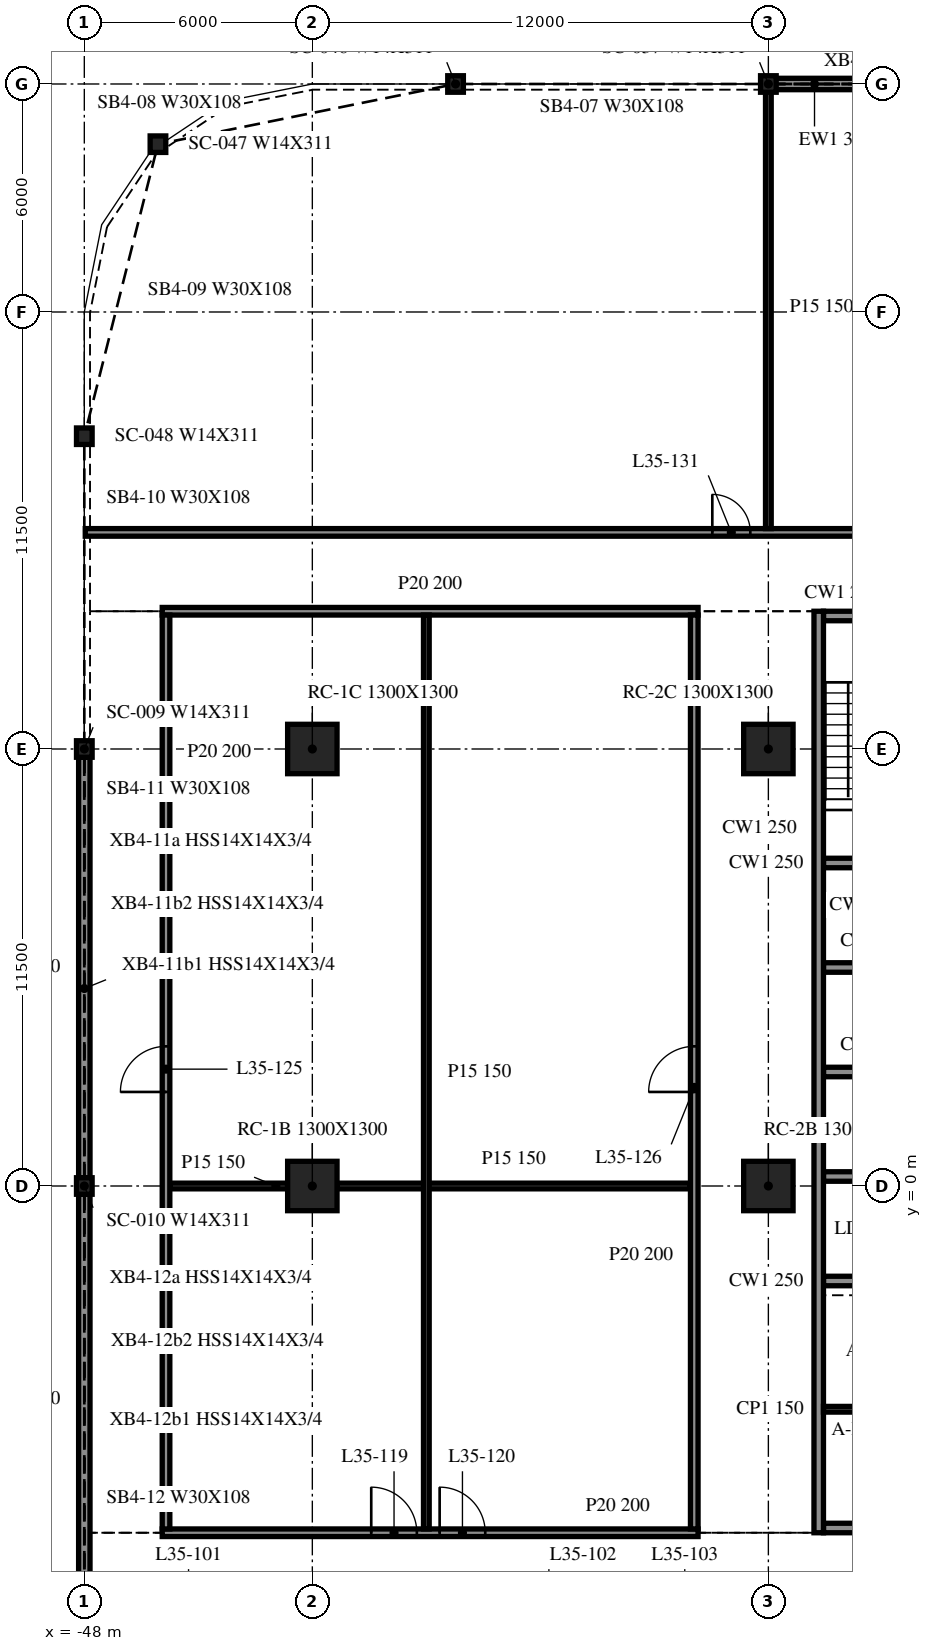
"""IFC4 building model, lengths in metres.
Left out: names, types, materials, properties, quantities, classifications, styles, units other than length and angle.
Written with IfcOpenShell. Run it as: python <this file> out.ifc"""

import sys

from ifc_helpers import new_model, si_unit, direction, frame, frame_2d, origin, origin_2d, place, context, subcontext, project, spatial, rectangle, i_section, extrude, element, fill, save


model = new_model("IFC4")
c1 = context("Model", 3, precision=1e-05, world=origin(), true_north=direction((0.0, 1.0)))
c2 = subcontext(c1, "Body", "Model", "MODEL_VIEW")
j1 = project(units=[si_unit("LENGTHUNIT", "METRE"), si_unit("PLANEANGLEUNIT", "RADIAN")], contexts=[c1])
p1 = place(None, origin())
s1 = spatial("IfcSite", under=j1, at=p1, CompositionType="ELEMENT")
p2 = place(p1, origin())
s2 = spatial("IfcBuilding", under=s1, at=p2, CompositionType="ELEMENT")
p3 = place(p2, frame((0.0, 0.0, 150.7)))
s3 = spatial("IfcBuildingStorey", under=s2, at=p3, CompositionType="ELEMENT", Elevation=150.7)
for number, where, z_axis, x_axis in (
    (1, (-42.0, 0.0, -0.34), (0.0, 0.0, 1.0), (1.0, 0.0, 0.0)),
    (2, (-42.0, 11.5, -0.34), (0.0, 0.0, 1.0), (1.0, 0.0, 0.0)),
    (3, (-30.0, 0.0, -0.34), (0.0, 0.0, 1.0), (1.0, 0.0, 0.0)),
    (4, (-30.0, 11.5, -0.34), (0.0, 0.0, 1.0), (1.0, 0.0, 0.0)),
):
    element("IfcColumn", number, at=place(p3, frame(where, z_axis=z_axis, x_axis=x_axis)), inside=s3, PredefinedType="COLUMN", context=c2, shape_type="SweptSolid", body=[
        extrude(rectangle(XDim=1.3, YDim=1.3, at=origin_2d()), origin(), (0.0, 0.0, 1.0), 3.89),
    ])
for number, where, z_axis, x_axis in (
    (5, (-30.0, 29.0, -0.34), (0.0, 0.0, 1.0), (1.0, 0.0, 0.0)),
    (6, (-38.231, 29.0, -0.34), (0.0, 0.0, 1.0), (1.0, 0.0, 0.0)),
    (7, (-46.062, 27.416, -0.34), (0.0, 0.0, 1.0), (1.0, 0.0, 0.0)),
    (8, (-48.0, 19.731, -0.34), (0.0, 0.0, 1.0), (1.0, 0.0, 0.0)),
    (9, (-48.0, 11.5, -0.34), (0.0, 0.0, 1.0), (1.0, 0.0, 0.0)),
    (10, (-48.0, 0.0, -0.34), (0.0, 0.0, 1.0), (1.0, 0.0, 0.0)),
):
    element("IfcColumn", number, at=place(p3, frame(where, z_axis=z_axis, x_axis=x_axis)), inside=s3, PredefinedType="COLUMN", context=c2, shape_type="SweptSolid", body=[
        extrude(i_section(OverallWidth=0.412, OverallDepth=0.434, WebThickness=0.036, FlangeThickness=0.057, at=origin_2d()), origin(), (0.0, 0.0, 1.0), 3.89),
    ])
p4 = place(p3, frame((-18.018, 29.0, 0.0), z_axis=(0.0, 0.0, 1.0), x_axis=(-1.0, 0.0, 0.0)))
e11 = element("IfcWall", 11, at=p4, inside=s3, PredefinedType="NOTDEFINED", context=c2, shape_type="SweptSolid", body=[
    extrude(rectangle(XDim=11.964, YDim=0.3, at=frame_2d((5.982, 0.0))), origin(), (0.0, 0.0, 1.0), 3.55),
])
p5 = place(p3, frame((-48.0, 11.282, 0.0), z_axis=(0.0, 0.0, 1.0), x_axis=(0.0, -1.0, 0.0)))
e12 = element("IfcWall", 12, at=p5, inside=s3, PredefinedType="NOTDEFINED", context=c2, shape_type="SweptSolid", body=[
    extrude(rectangle(XDim=11.064, YDim=0.3, at=frame_2d((5.532, 0.0))), origin(), (0.0, 0.0, 1.0), 3.55),
])
p6 = place(p3, frame((-48.0, -0.218, 0.0), z_axis=(0.0, 0.0, 1.0), x_axis=(0.0, -1.0, 0.0)))
e13 = element("IfcWall", 13, at=p6, inside=s3, PredefinedType="NOTDEFINED", context=c2, shape_type="SweptSolid", body=[
    extrude(rectangle(XDim=10.782, YDim=0.3, at=frame_2d((5.391, 0.0))), origin(), (0.0, 0.0, 1.0), 3.55),
])
p7 = place(p3, frame((-28.675, 15.125, 0.0), z_axis=(0.0, 0.0, 1.0), x_axis=(0.0, -1.0, 0.0)))
e14 = element("IfcWall", 14, at=p7, inside=s3, PredefinedType="SOLIDWALL", context=c2, shape_type="SweptSolid", body=[
    extrude(rectangle(XDim=24.25, YDim=0.25, at=frame_2d((12.125, 0.0))), origin(), (0.0, 0.0, 1.0), 3.55),
])
p8 = place(p3, frame((-19.45, -9.0, 0.0), z_axis=(0.0, 0.0, 1.0), x_axis=(-1.0, 0.0, 0.0)))
e15 = element("IfcWall", 15, at=p8, inside=s3, PredefinedType="SOLIDWALL", context=c2, shape_type="SweptSolid", body=[
    extrude(rectangle(XDim=9.1, YDim=0.25, at=frame_2d((4.55, 0.0))), origin(), (0.0, 0.0, 1.0), 3.55),
])
p9 = place(p8, frame((3.65, 0.0, 0.0)))
e16 = element("IfcOpeningElement", 16, at=p9, cuts=e15, PredefinedType="OPENING", context=c2, shape_type="SweptSolid", body=[
    extrude(rectangle(XDim=1.8, YDim=2.1, at=frame_2d((0.9, 1.05))), frame((0.0, 0.135, 0.0), z_axis=(0.0, -1.0, 0.0), x_axis=(1.0, 0.0, 0.0)), (0.0, 0.0, 1.0), 0.27),
])
p10 = place(p3, frame((-28.55, 15.0, 0.0), z_axis=(0.0, 0.0, 1.0), x_axis=(1.0, 0.0, 0.0)))
e17 = element("IfcWall", 17, at=p10, inside=s3, PredefinedType="SOLIDWALL", context=c2, shape_type="SweptSolid", body=[
    extrude(rectangle(XDim=9.1, YDim=0.25, at=frame_2d((4.55, 0.0))), origin(), (0.0, 0.0, 1.0), 3.55),
])
p11 = place(p10, frame((3.65, 0.0, 0.0)))
e18 = element("IfcOpeningElement", 18, at=p11, cuts=e17, PredefinedType="OPENING", context=c2, shape_type="SweptSolid", body=[
    extrude(rectangle(XDim=1.8, YDim=2.1, at=frame_2d((0.9, 1.05))), frame((0.0, 0.135, 0.0), z_axis=(0.0, -1.0, 0.0), x_axis=(1.0, 0.0, 0.0)), (0.0, 0.0, 1.0), 0.27),
])
for number, where, z_axis, x_axis in (
    (19, (-28.55, -2.5, 0.0), (0.0, 0.0, 1.0), (1.0, 0.0, 0.0)),
    (20, (-28.55, 0.25, 0.0), (0.0, 0.0, 1.0), (1.0, 0.0, 0.0)),
    (21, (-28.55, 3.0, 0.0), (0.0, 0.0, 1.0), (1.0, 0.0, 0.0)),
    (22, (-28.55, 5.75, 0.0), (0.0, 0.0, 1.0), (1.0, 0.0, 0.0)),
    (23, (-28.55, 8.5, 0.0), (0.0, 0.0, 1.0), (1.0, 0.0, 0.0)),
):
    element("IfcWall", number, at=place(p3, frame(where, z_axis=z_axis, x_axis=x_axis)), inside=s3, PredefinedType="SOLIDWALL", context=c2, shape_type="SweptSolid", body=[
        extrude(rectangle(XDim=2.85, YDim=0.25, at=frame_2d((1.425, 0.0))), origin(), (0.0, 0.0, 1.0), 3.55),
    ])
p12 = place(p3, frame((-28.55, -5.875, 0.0), z_axis=(0.0, 0.0, 1.0), x_axis=(1.0, 0.0, 0.0)))
e24 = element("IfcWall", 24, at=p12, inside=s3, PredefinedType="PARTITIONING", context=c2, shape_type="SweptSolid", body=[
    extrude(rectangle(XDim=2.85, YDim=0.15, at=frame_2d((1.425, 0.0))), origin(), (0.0, 0.0, 1.0), 3.55),
])
p13 = place(p3, frame((-45.95, -9.125, 0.0), z_axis=(0.0, 0.0, 1.0), x_axis=(1.0, 0.0, 0.0)))
e25 = element("IfcWall", 25, at=p13, inside=s3, PredefinedType="PARTITIONING", context=c2, shape_type="SweptSolid", body=[
    extrude(rectangle(XDim=14.1, YDim=0.2, at=frame_2d((7.05, 0.0))), origin(), (0.0, 0.0, 1.0), 3.55),
])
p14 = place(p13, frame((5.5, 0.0, 0.0)))
e26 = element("IfcOpeningElement", 26, at=p14, cuts=e25, PredefinedType="OPENING", context=c2, shape_type="SweptSolid", body=[
    extrude(rectangle(XDim=1.2, YDim=2.1, at=frame_2d((0.6, 1.05))), frame((0.0, 0.11, 0.0), z_axis=(0.0, -1.0, 0.0), x_axis=(1.0, 0.0, 0.0)), (0.0, 0.0, 1.0), 0.22),
])
p15 = place(p13, frame((7.3, 0.0, 0.0)))
e27 = element("IfcOpeningElement", 27, at=p15, cuts=e25, PredefinedType="OPENING", context=c2, shape_type="SweptSolid", body=[
    extrude(rectangle(XDim=1.2, YDim=2.1, at=frame_2d((0.6, 1.05))), frame((0.0, 0.11, 0.0), z_axis=(0.0, -1.0, 0.0), x_axis=(1.0, 0.0, 0.0)), (0.0, 0.0, 1.0), 0.22),
])
p16 = place(p3, frame((-45.75, 0.0, 0.0), z_axis=(0.0, 0.0, 1.0), x_axis=(1.0, 0.0, 0.0)))
e28 = element("IfcWall", 28, at=p16, inside=s3, PredefinedType="PARTITIONING", context=c2, shape_type="SweptSolid", body=[
    extrude(rectangle(XDim=3.1, YDim=0.15, at=frame_2d((1.55, 0.0))), origin(), (0.0, 0.0, 1.0), 3.55),
])
p17 = place(p3, frame((-41.35, 0.0, 0.0), z_axis=(0.0, 0.0, 1.0), x_axis=(1.0, 0.0, 0.0)))
e29 = element("IfcWall", 29, at=p17, inside=s3, PredefinedType="PARTITIONING", context=c2, shape_type="SweptSolid", body=[
    extrude(rectangle(XDim=9.3, YDim=0.15, at=frame_2d((4.65, 0.0))), origin(), (0.0, 0.0, 1.0), 3.55),
])
p18 = place(p3, frame((-45.95, 15.125, 0.0), z_axis=(0.0, 0.0, 1.0), x_axis=(1.0, 0.0, 0.0)))
e30 = element("IfcWall", 30, at=p18, inside=s3, PredefinedType="PARTITIONING", context=c2, shape_type="SweptSolid", body=[
    extrude(rectangle(XDim=14.1, YDim=0.2, at=frame_2d((7.05, 0.0))), origin(), (0.0, 0.0, 1.0), 3.55),
])
p19 = place(p3, frame((-47.975, 17.2, 0.0), z_axis=(0.0, 0.0, 1.0), x_axis=(1.0, 0.0, 0.0)))
e31 = element("IfcWall", 31, at=p19, inside=s3, PredefinedType="PARTITIONING", context=c2, shape_type="SweptSolid", body=[
    extrude(rectangle(XDim=95.95, YDim=0.2, at=frame_2d((47.975, 0.0))), origin(), (0.0, 0.0, 1.0), 3.55),
])
p20 = place(p19, frame((16.5, 0.0, 0.0)))
e32 = element("IfcOpeningElement", 32, at=p20, cuts=e31, PredefinedType="OPENING", context=c2, shape_type="SweptSolid", body=[
    extrude(rectangle(XDim=1.0, YDim=2.1, at=frame_2d((0.5, 1.05))), frame((0.0, 0.11, 0.0), z_axis=(0.0, -1.0, 0.0), x_axis=(1.0, 0.0, 0.0)), (0.0, 0.0, 1.0), 0.22),
])
p21 = place(p19, frame((22.5, 0.0, 0.0)))
e33 = element("IfcOpeningElement", 33, at=p21, cuts=e31, PredefinedType="OPENING", context=c2, shape_type="SweptSolid", body=[
    extrude(rectangle(XDim=1.0, YDim=2.1, at=frame_2d((0.5, 1.05))), frame((0.0, 0.11, 0.0), z_axis=(0.0, -1.0, 0.0), x_axis=(1.0, 0.0, 0.0)), (0.0, 0.0, 1.0), 0.22),
])
p22 = place(p19, frame((25.5, 0.0, 0.0)))
e34 = element("IfcOpeningElement", 34, at=p22, cuts=e31, PredefinedType="OPENING", context=c2, shape_type="SweptSolid", body=[
    extrude(rectangle(XDim=1.0, YDim=2.1, at=frame_2d((0.5, 1.05))), frame((0.0, 0.11, 0.0), z_axis=(0.0, -1.0, 0.0), x_axis=(1.0, 0.0, 0.0)), (0.0, 0.0, 1.0), 0.22),
])
p23 = place(p19, frame((43.3, 0.0, 0.0)))
e35 = element("IfcOpeningElement", 35, at=p23, cuts=e31, PredefinedType="OPENING", context=c2, shape_type="SweptSolid", body=[
    extrude(rectangle(XDim=1.2, YDim=2.1, at=frame_2d((0.6, 1.05))), frame((0.0, 0.11, 0.0), z_axis=(0.0, -1.0, 0.0), x_axis=(1.0, 0.0, 0.0)), (0.0, 0.0, 1.0), 0.22),
])
p24 = place(p19, frame((47.3, 0.0, 0.0)))
e36 = element("IfcOpeningElement", 36, at=p24, cuts=e31, PredefinedType="OPENING", context=c2, shape_type="SweptSolid", body=[
    extrude(rectangle(XDim=1.2, YDim=2.1, at=frame_2d((0.6, 1.05))), frame((0.0, 0.11, 0.0), z_axis=(0.0, -1.0, 0.0), x_axis=(1.0, 0.0, 0.0)), (0.0, 0.0, 1.0), 0.22),
])
p25 = place(p19, frame((51.1, 0.0, 0.0)))
e37 = element("IfcOpeningElement", 37, at=p25, cuts=e31, PredefinedType="OPENING", context=c2, shape_type="SweptSolid", body=[
    extrude(rectangle(XDim=1.2, YDim=2.1, at=frame_2d((0.6, 1.05))), frame((0.0, 0.11, 0.0), z_axis=(0.0, -1.0, 0.0), x_axis=(1.0, 0.0, 0.0)), (0.0, 0.0, 1.0), 0.22),
])
p26 = place(p19, frame((54.1, 0.0, 0.0)))
e38 = element("IfcOpeningElement", 38, at=p26, cuts=e31, PredefinedType="OPENING", context=c2, shape_type="SweptSolid", body=[
    extrude(rectangle(XDim=1.0, YDim=2.1, at=frame_2d((0.5, 1.05))), frame((0.0, 0.11, 0.0), z_axis=(0.0, -1.0, 0.0), x_axis=(1.0, 0.0, 0.0)), (0.0, 0.0, 1.0), 0.22),
])
p27 = place(p19, frame((72.1, 0.0, 0.0)))
e39 = element("IfcOpeningElement", 39, at=p27, cuts=e31, PredefinedType="OPENING", context=c2, shape_type="SweptSolid", body=[
    extrude(rectangle(XDim=1.0, YDim=2.1, at=frame_2d((0.5, 1.05))), frame((0.0, 0.11, 0.0), z_axis=(0.0, -1.0, 0.0), x_axis=(1.0, 0.0, 0.0)), (0.0, 0.0, 1.0), 0.22),
])
p28 = place(p19, frame((78.1, 0.0, 0.0)))
e40 = element("IfcOpeningElement", 40, at=p28, cuts=e31, PredefinedType="OPENING", context=c2, shape_type="SweptSolid", body=[
    extrude(rectangle(XDim=1.0, YDim=2.1, at=frame_2d((0.5, 1.05))), frame((0.0, 0.11, 0.0), z_axis=(0.0, -1.0, 0.0), x_axis=(1.0, 0.0, 0.0)), (0.0, 0.0, 1.0), 0.22),
])
p29 = place(p19, frame((81.1, 0.0, 0.0)))
e41 = element("IfcOpeningElement", 41, at=p29, cuts=e31, PredefinedType="OPENING", context=c2, shape_type="SweptSolid", body=[
    extrude(rectangle(XDim=1.2, YDim=2.1, at=frame_2d((0.6, 1.05))), frame((0.0, 0.11, 0.0), z_axis=(0.0, -1.0, 0.0), x_axis=(1.0, 0.0, 0.0)), (0.0, 0.0, 1.0), 0.22),
])
p30 = place(p3, frame((-45.85, -9.025, 0.0), z_axis=(0.0, 0.0, 1.0), x_axis=(0.0, 1.0, 0.0)))
e42 = element("IfcWall", 42, at=p30, inside=s3, PredefinedType="PARTITIONING", context=c2, shape_type="SweptSolid", body=[
    extrude(rectangle(XDim=24.05, YDim=0.2, at=frame_2d((12.025, 0.0))), origin(), (0.0, 0.0, 1.0), 3.55),
])
p31 = place(p30, frame((11.5, 0.0, 0.0)))
e43 = element("IfcOpeningElement", 43, at=p31, cuts=e42, PredefinedType="OPENING", context=c2, shape_type="SweptSolid", body=[
    extrude(rectangle(XDim=1.2, YDim=2.1, at=frame_2d((0.6, 1.05))), frame((0.0, 0.11, 0.0), z_axis=(0.0, -1.0, 0.0), x_axis=(1.0, 0.0, 0.0)), (0.0, 0.0, 1.0), 0.22),
])
p32 = place(p3, frame((-39.0, -9.025, 0.0), z_axis=(0.0, 0.0, 1.0), x_axis=(0.0, 1.0, 0.0)))
e44 = element("IfcWall", 44, at=p32, inside=s3, PredefinedType="PARTITIONING", context=c2, shape_type="SweptSolid", body=[
    extrude(rectangle(XDim=24.05, YDim=0.15, at=frame_2d((12.025, 0.0))), origin(), (0.0, 0.0, 1.0), 3.55),
])
p33 = place(p3, frame((-31.95, -9.025, 0.0), z_axis=(0.0, 0.0, 1.0), x_axis=(0.0, 1.0, 0.0)))
e45 = element("IfcWall", 45, at=p33, inside=s3, PredefinedType="PARTITIONING", context=c2, shape_type="SweptSolid", body=[
    extrude(rectangle(XDim=24.05, YDim=0.2, at=frame_2d((12.025, 0.0))), origin(), (0.0, 0.0, 1.0), 3.55),
])
p34 = place(p33, frame((11.5, 0.0, 0.0)))
e46 = element("IfcOpeningElement", 46, at=p34, cuts=e45, PredefinedType="OPENING", context=c2, shape_type="SweptSolid", body=[
    extrude(rectangle(XDim=1.2, YDim=2.1, at=frame_2d((0.6, 1.05))), frame((0.0, 0.11, 0.0), z_axis=(0.0, -1.0, 0.0), x_axis=(1.0, 0.0, 0.0)), (0.0, 0.0, 1.0), 0.22),
])
p35 = place(p3, frame((-30.0, 17.3, 0.0), z_axis=(0.0, 0.0, 1.0), x_axis=(0.0, 1.0, 0.0)))
e47 = element("IfcWall", 47, at=p35, inside=s3, PredefinedType="PARTITIONING", context=c2, shape_type="SweptSolid", body=[
    extrude(rectangle(XDim=11.675, YDim=0.15, at=frame_2d((5.837, 0.0))), origin(), (0.0, 0.0, 1.0), 2.551),
])
p36 = place(p14, origin())
e48 = element("IfcDoor", 48, at=p36, inside=s3, OperationType="SINGLE_SWING_LEFT", PredefinedType="DOOR", context=c2, shape_type="SweptSolid", body=[
    extrude(rectangle(XDim=1.2, YDim=2.1, at=frame_2d((0.6, 1.05))), frame((0.0, 0.025, 0.0), z_axis=(0.0, -1.0, 0.0), x_axis=(1.0, 0.0, 0.0)), (0.0, 0.0, 1.0), 0.05),
])
fill(e26, e48)
p37 = place(p15, origin())
e49 = element("IfcDoor", 49, at=p37, inside=s3, OperationType="SINGLE_SWING_RIGHT", PredefinedType="DOOR", context=c2, shape_type="SweptSolid", body=[
    extrude(rectangle(XDim=1.2, YDim=2.1, at=frame_2d((0.6, 1.05))), frame((0.0, 0.025, 0.0), z_axis=(0.0, -1.0, 0.0), x_axis=(1.0, 0.0, 0.0)), (0.0, 0.0, 1.0), 0.05),
])
fill(e27, e49)
p38 = place(p31, origin())
e50 = element("IfcDoor", 50, at=p38, inside=s3, OperationType="SINGLE_SWING_LEFT", PredefinedType="DOOR", context=c2, shape_type="SweptSolid", body=[
    extrude(rectangle(XDim=1.2, YDim=2.1, at=frame_2d((0.6, 1.05))), frame((0.0, 0.025, 0.0), z_axis=(0.0, -1.0, 0.0), x_axis=(1.0, 0.0, 0.0)), (0.0, 0.0, 1.0), 0.05),
])
fill(e43, e50)
p39 = place(p34, origin())
e51 = element("IfcDoor", 51, at=p39, inside=s3, OperationType="SINGLE_SWING_RIGHT", PredefinedType="DOOR", context=c2, shape_type="SweptSolid", body=[
    extrude(rectangle(XDim=1.2, YDim=2.1, at=frame_2d((0.6, 1.05))), frame((0.0, 0.025, 0.0), z_axis=(0.0, -1.0, 0.0), x_axis=(1.0, 0.0, 0.0)), (0.0, 0.0, 1.0), 0.05),
])
fill(e46, e51)
p40 = place(p20, origin())
e52 = element("IfcDoor", 52, at=p40, inside=s3, OperationType="SINGLE_SWING_LEFT", PredefinedType="DOOR", context=c2, shape_type="SweptSolid", body=[
    extrude(rectangle(XDim=1.0, YDim=2.1, at=frame_2d((0.5, 1.05))), frame((0.0, 0.025, 0.0), z_axis=(0.0, -1.0, 0.0), x_axis=(1.0, 0.0, 0.0)), (0.0, 0.0, 1.0), 0.05),
])
fill(e32, e52)
save(model, sys.argv[1])
